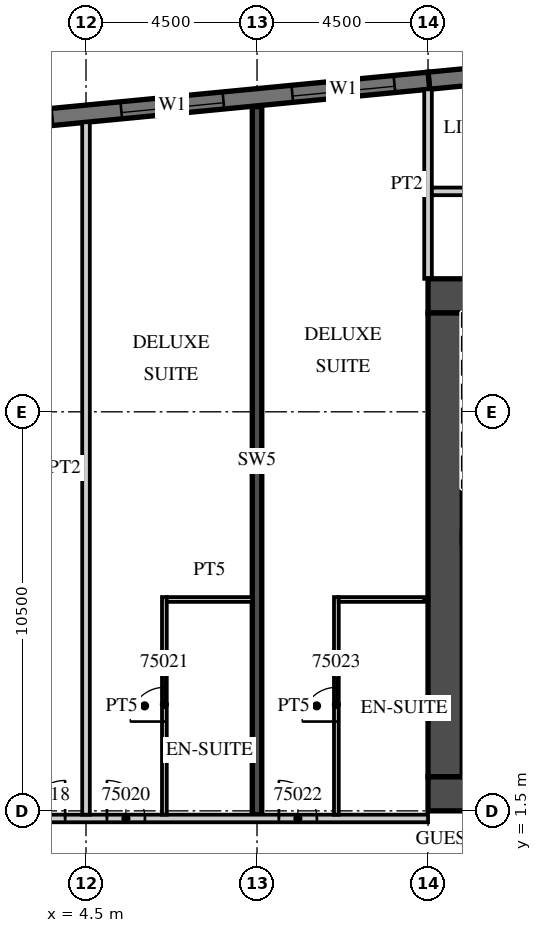
"""IFC4 building model, lengths in metres.
Left out: names, types, materials, properties, quantities, classifications, styles, units other than length and angle.
Written with IfcOpenShell. Run it as: python <this file> out.ifc"""

import sys

from ifc_helpers import new_model, si_unit, direction, frame, frame_2d, origin, place, context, subcontext, project, spatial, rectangle, extrude, element, fill, save


model = new_model("IFC4")
c1 = context("Model", 3, precision=1e-05, world=origin(), true_north=direction((0.0, 1.0)))
c2 = subcontext(c1, "Body", "Model", "MODEL_VIEW")
j1 = project(units=[si_unit("LENGTHUNIT", "METRE"), si_unit("PLANEANGLEUNIT", "RADIAN")], contexts=[c1])
p1 = place(None, origin())
s1 = spatial("IfcSite", under=j1, at=p1, CompositionType="ELEMENT")
p2 = place(p1, origin())
s2 = spatial("IfcBuilding", under=s1, at=p2, CompositionType="ELEMENT")
p3 = place(p2, frame((0.0, 0.0, 298.2)))
s3 = spatial("IfcBuildingStorey", under=s2, at=p3, CompositionType="ELEMENT", Elevation=298.2)
p4 = place(p3, frame((9.0, 1.4, 0.0), z_axis=(0.0, 0.0, 1.0), x_axis=(0.0, 1.0, 0.0)))
e1 = element("IfcWall", 1, at=p4, inside=s3, PredefinedType="SHEAR", context=c2, shape_type="SweptSolid", body=[
    extrude(rectangle(XDim=18.629, YDim=0.25, at=frame_2d((9.315, 0.0))), origin(), (0.0, 0.0, 1.0), 3.3),
])
p5 = place(p3, frame((30.946, 22.391, 0.0), z_axis=(0.0, 0.0, 1.0), x_axis=(-0.995396397117, -0.095843688398, 0.0)))
e2 = element("IfcWall", 2, at=p5, inside=s3, PredefinedType="SOLIDWALL", context=c2, shape_type="SweptSolid", body=[
    extrude(rectangle(XDim=17.505, YDim=0.45, at=frame_2d((8.752, 0.0))), origin(), (0.0, 0.0, 1.0), 3.02),
])
p6 = place(p3, frame((13.521, 20.713, 0.0), z_axis=(0.0, 0.0, 1.0), x_axis=(-0.995396277313, -0.095844932638, 0.0)))
e3 = element("IfcWall", 3, at=p6, inside=s3, PredefinedType="SOLIDWALL", context=c2, shape_type="SweptSolid", body=[
    extrude(rectangle(XDim=51.495, YDim=0.45, at=frame_2d((25.748, 0.0))), origin(), (0.0, 0.0, 1.0), 3.02),
])
p7 = place(p6, frame((0.91, 0.0, 0.45)))
e4 = element("IfcOpeningElement", 4, at=p7, cuts=e3, PredefinedType="OPENING", context=c2, shape_type="SweptSolid", body=[
    extrude(rectangle(XDim=2.7, YDim=2.25, at=frame_2d((1.35, 1.125))), frame((0.0, 0.235, 0.0), z_axis=(0.0, -1.0, 0.0), x_axis=(1.0, 0.0, 0.0)), (0.0, 0.0, 1.0), 0.47),
])
p8 = place(p6, frame((5.431, 0.0, 0.45)))
e5 = element("IfcOpeningElement", 5, at=p8, cuts=e3, PredefinedType="OPENING", context=c2, shape_type="SweptSolid", body=[
    extrude(rectangle(XDim=2.7, YDim=2.25, at=frame_2d((1.35, 1.125))), frame((0.0, 0.235, 0.0), z_axis=(0.0, -1.0, 0.0), x_axis=(1.0, 0.0, 0.0)), (0.0, 0.0, 1.0), 0.47),
])
p9 = place(p6, frame((9.952, 0.0, 0.45)))
e6 = element("IfcOpeningElement", 6, at=p9, cuts=e3, PredefinedType="OPENING", context=c2, shape_type="SweptSolid", body=[
    extrude(rectangle(XDim=2.7, YDim=2.25, at=frame_2d((1.35, 1.125))), frame((0.0, 0.235, 0.0), z_axis=(0.0, -1.0, 0.0), x_axis=(1.0, 0.0, 0.0)), (0.0, 0.0, 1.0), 0.47),
])
p10 = place(p6, frame((14.473, 0.0, 0.45)))
e7 = element("IfcOpeningElement", 7, at=p10, cuts=e3, PredefinedType="OPENING", context=c2, shape_type="SweptSolid", body=[
    extrude(rectangle(XDim=2.7, YDim=2.25, at=frame_2d((1.35, 1.125))), frame((0.0, 0.235, 0.0), z_axis=(0.0, -1.0, 0.0), x_axis=(1.0, 0.0, 0.0)), (0.0, 0.0, 1.0), 0.47),
])
p11 = place(p6, frame((18.994, 0.0, 0.45)))
e8 = element("IfcOpeningElement", 8, at=p11, cuts=e3, PredefinedType="OPENING", context=c2, shape_type="SweptSolid", body=[
    extrude(rectangle(XDim=2.7, YDim=2.25, at=frame_2d((1.35, 1.125))), frame((0.0, 0.235, 0.0), z_axis=(0.0, -1.0, 0.0), x_axis=(1.0, 0.0, 0.0)), (0.0, 0.0, 1.0), 0.47),
])
p12 = place(p6, frame((23.514, 0.0, 0.45)))
e9 = element("IfcOpeningElement", 9, at=p12, cuts=e3, PredefinedType="OPENING", context=c2, shape_type="SweptSolid", body=[
    extrude(rectangle(XDim=2.7, YDim=2.25, at=frame_2d((1.35, 1.125))), frame((0.0, 0.235, 0.0), z_axis=(0.0, -1.0, 0.0), x_axis=(1.0, 0.0, 0.0)), (0.0, 0.0, 1.0), 0.47),
])
p13 = place(p6, frame((28.035, 0.0, 0.45)))
e10 = element("IfcOpeningElement", 10, at=p13, cuts=e3, PredefinedType="OPENING", context=c2, shape_type="SweptSolid", body=[
    extrude(rectangle(XDim=2.7, YDim=2.25, at=frame_2d((1.35, 1.125))), frame((0.0, 0.235, 0.0), z_axis=(0.0, -1.0, 0.0), x_axis=(1.0, 0.0, 0.0)), (0.0, 0.0, 1.0), 0.47),
])
p14 = place(p6, frame((32.556, 0.0, 0.45)))
e11 = element("IfcOpeningElement", 11, at=p14, cuts=e3, PredefinedType="OPENING", context=c2, shape_type="SweptSolid", body=[
    extrude(rectangle(XDim=2.7, YDim=2.25, at=frame_2d((1.35, 1.125))), frame((0.0, 0.235, 0.0), z_axis=(0.0, -1.0, 0.0), x_axis=(1.0, 0.0, 0.0)), (0.0, 0.0, 1.0), 0.47),
])
p15 = place(p6, frame((37.077, 0.0, 0.45)))
e12 = element("IfcOpeningElement", 12, at=p15, cuts=e3, PredefinedType="OPENING", context=c2, shape_type="SweptSolid", body=[
    extrude(rectangle(XDim=2.7, YDim=2.25, at=frame_2d((1.35, 1.125))), frame((0.0, 0.235, 0.0), z_axis=(0.0, -1.0, 0.0), x_axis=(1.0, 0.0, 0.0)), (0.0, 0.0, 1.0), 0.47),
])
p16 = place(p6, frame((41.598, 0.0, 0.45)))
e13 = element("IfcOpeningElement", 13, at=p16, cuts=e3, PredefinedType="OPENING", context=c2, shape_type="SweptSolid", body=[
    extrude(rectangle(XDim=2.7, YDim=2.25, at=frame_2d((1.35, 1.125))), frame((0.0, 0.235, 0.0), z_axis=(0.0, -1.0, 0.0), x_axis=(1.0, 0.0, 0.0)), (0.0, 0.0, 1.0), 0.47),
])
p17 = place(p6, frame((46.118, 0.0, 0.45)))
e14 = element("IfcOpeningElement", 14, at=p17, cuts=e3, PredefinedType="OPENING", context=c2, shape_type="SweptSolid", body=[
    extrude(rectangle(XDim=2.7, YDim=2.25, at=frame_2d((1.35, 1.125))), frame((0.0, 0.235, 0.0), z_axis=(0.0, -1.0, 0.0), x_axis=(1.0, 0.0, 0.0)), (0.0, 0.0, 1.0), 0.47),
])
p18 = place(p3, frame((13.5, 15.5, 0.0), z_axis=(0.0, 0.0, 1.0), x_axis=(0.0, 1.0, 0.0)))
e15 = element("IfcWall", 15, at=p18, inside=s3, PredefinedType="PARTITIONING", context=c2, shape_type="SweptSolid", body=[
    extrude(rectangle(XDim=4.985, YDim=0.2, at=frame_2d((2.493, 0.0))), origin(), (0.0, 0.0, 1.0), 3.02),
])
p19 = place(p3, frame((-39.909, 1.3, 0.0), z_axis=(0.0, 0.0, 1.0), x_axis=(1.0, 0.0, 0.0)))
e16 = element("IfcWall", 16, at=p19, inside=s3, PredefinedType="PARTITIONING", context=c2, shape_type="SweptSolid", body=[
    extrude(rectangle(XDim=53.409, YDim=0.2, at=frame_2d((26.705, 0.0))), origin(), (0.0, 0.0, 1.0), 3.02),
])
p20 = place(p19, frame((0.255, 0.0, 0.0)))
e17 = element("IfcOpeningElement", 17, at=p20, cuts=e16, PredefinedType="OPENING", context=c2, shape_type="SweptSolid", body=[
    extrude(rectangle(XDim=0.9, YDim=2.1, at=frame_2d((0.45, 1.05))), frame((0.0, 0.11, 0.0), z_axis=(0.0, -1.0, 0.0), x_axis=(1.0, 0.0, 0.0)), (0.0, 0.0, 1.0), 0.22),
])
p21 = place(p19, frame((4.484, 0.0, 0.0)))
e18 = element("IfcOpeningElement", 18, at=p21, cuts=e16, PredefinedType="OPENING", context=c2, shape_type="SweptSolid", body=[
    extrude(rectangle(XDim=1.0, YDim=2.1, at=frame_2d((0.5, 1.05))), frame((0.0, 0.11, 0.0), z_axis=(0.0, -1.0, 0.0), x_axis=(1.0, 0.0, 0.0)), (0.0, 0.0, 1.0), 0.22),
])
p22 = place(p19, frame((11.334, 0.0, 0.0)))
e19 = element("IfcOpeningElement", 19, at=p22, cuts=e16, PredefinedType="OPENING", context=c2, shape_type="SweptSolid", body=[
    extrude(rectangle(XDim=1.0, YDim=2.1, at=frame_2d((0.5, 1.05))), frame((0.0, 0.11, 0.0), z_axis=(0.0, -1.0, 0.0), x_axis=(1.0, 0.0, 0.0)), (0.0, 0.0, 1.0), 0.22),
])
p23 = place(p19, frame((15.347, 0.0, 0.0)))
e20 = element("IfcOpeningElement", 20, at=p23, cuts=e16, PredefinedType="OPENING", context=c2, shape_type="SweptSolid", body=[
    extrude(rectangle(XDim=1.2, YDim=2.1, at=frame_2d((0.6, 1.05))), frame((0.0, 0.11, 0.0), z_axis=(0.0, -1.0, 0.0), x_axis=(1.0, 0.0, 0.0)), (0.0, 0.0, 1.0), 0.22),
])
p24 = place(p19, frame((24.859, 0.0, 0.0)))
e21 = element("IfcOpeningElement", 21, at=p24, cuts=e16, PredefinedType="OPENING", context=c2, shape_type="SweptSolid", body=[
    extrude(rectangle(XDim=1.0, YDim=2.1, at=frame_2d((0.5, 1.05))), frame((0.0, 0.11, 0.0), z_axis=(0.0, -1.0, 0.0), x_axis=(1.0, 0.0, 0.0)), (0.0, 0.0, 1.0), 0.22),
])
p25 = place(p19, frame((26.959, 0.0, 0.0)))
e22 = element("IfcOpeningElement", 22, at=p25, cuts=e16, PredefinedType="OPENING", context=c2, shape_type="SweptSolid", body=[
    extrude(rectangle(XDim=1.0, YDim=2.1, at=frame_2d((0.5, 1.05))), frame((0.0, 0.11, 0.0), z_axis=(0.0, -1.0, 0.0), x_axis=(1.0, 0.0, 0.0)), (0.0, 0.0, 1.0), 0.22),
])
p26 = place(p19, frame((33.346, 0.0, 0.0)))
e23 = element("IfcOpeningElement", 23, at=p26, cuts=e16, PredefinedType="OPENING", context=c2, shape_type="SweptSolid", body=[
    extrude(rectangle(XDim=1.2, YDim=2.1, at=frame_2d((0.6, 1.05))), frame((0.0, 0.11, 0.0), z_axis=(0.0, -1.0, 0.0), x_axis=(1.0, 0.0, 0.0)), (0.0, 0.0, 1.0), 0.22),
])
p27 = place(p19, frame((42.859, 0.0, 0.0)))
e24 = element("IfcOpeningElement", 24, at=p27, cuts=e16, PredefinedType="OPENING", context=c2, shape_type="SweptSolid", body=[
    extrude(rectangle(XDim=1.0, YDim=2.1, at=frame_2d((0.5, 1.05))), frame((0.0, 0.11, 0.0), z_axis=(0.0, -1.0, 0.0), x_axis=(1.0, 0.0, 0.0)), (0.0, 0.0, 1.0), 0.22),
])
p28 = place(p19, frame((44.959, 0.0, 0.0)))
e25 = element("IfcOpeningElement", 25, at=p28, cuts=e16, PredefinedType="OPENING", context=c2, shape_type="SweptSolid", body=[
    extrude(rectangle(XDim=1.0, YDim=2.1, at=frame_2d((0.5, 1.05))), frame((0.0, 0.11, 0.0), z_axis=(0.0, -1.0, 0.0), x_axis=(1.0, 0.0, 0.0)), (0.0, 0.0, 1.0), 0.22),
])
p29 = place(p19, frame((49.484, 0.0, 0.0)))
e26 = element("IfcOpeningElement", 26, at=p29, cuts=e16, PredefinedType="OPENING", context=c2, shape_type="SweptSolid", body=[
    extrude(rectangle(XDim=1.0, YDim=2.1, at=frame_2d((0.5, 1.05))), frame((0.0, 0.11, 0.0), z_axis=(0.0, -1.0, 0.0), x_axis=(1.0, 0.0, 0.0)), (0.0, 0.0, 1.0), 0.22),
])
p30 = place(p3, frame((4.5, 1.4, 0.0), z_axis=(0.0, 0.0, 1.0), x_axis=(0.0, 1.0, 0.0)))
e27 = element("IfcWall", 27, at=p30, inside=s3, PredefinedType="PARTITIONING", context=c2, shape_type="SweptSolid", body=[
    extrude(rectangle(XDim=18.218, YDim=0.2, at=frame_2d((9.109, 0.0))), origin(), (0.0, 0.0, 1.0), 3.02),
])
p31 = place(p3, frame((6.562, 1.4, 0.0), z_axis=(0.0, 0.0, 1.0), x_axis=(0.0, 1.0, 0.0)))
e28 = element("IfcWall", 28, at=p31, inside=s3, PredefinedType="PARTITIONING", context=c2, shape_type="SweptSolid", body=[
    extrude(rectangle(XDim=5.725, YDim=0.125, at=frame_2d((2.863, 0.0))), origin(), (0.0, 0.0, 1.0), 3.02),
])
p32 = place(p31, frame((2.45, 0.0, 0.0)))
e29 = element("IfcOpeningElement", 29, at=p32, cuts=e28, PredefinedType="OPENING", context=c2, shape_type="SweptSolid", body=[
    extrude(rectangle(XDim=0.9, YDim=2.1, at=frame_2d((0.45, 1.05))), frame((0.0, 0.073, 0.0), z_axis=(0.0, -1.0, 0.0), x_axis=(1.0, 0.0, 0.0)), (0.0, 0.0, 1.0), 0.145),
])
p33 = place(p3, frame((6.625, 7.062, 0.0), z_axis=(0.0, 0.0, 1.0), x_axis=(1.0, 0.0, 0.0)))
e30 = element("IfcWall", 30, at=p33, inside=s3, PredefinedType="PARTITIONING", context=c2, shape_type="SweptSolid", body=[
    extrude(rectangle(XDim=2.25, YDim=0.125, at=frame_2d((1.125, 0.0))), origin(), (0.0, 0.0, 1.0), 3.02),
])
p34 = place(p3, frame((11.088, 1.4, 0.0), z_axis=(0.0, 0.0, 1.0), x_axis=(0.0, 1.0, 0.0)))
e31 = element("IfcWall", 31, at=p34, inside=s3, PredefinedType="PARTITIONING", context=c2, shape_type="SweptSolid", body=[
    extrude(rectangle(XDim=5.725, YDim=0.125, at=frame_2d((2.863, 0.0))), origin(), (0.0, 0.0, 1.0), 3.02),
])
p35 = place(p34, frame((2.45, 0.0, 0.0)))
e32 = element("IfcOpeningElement", 32, at=p35, cuts=e31, PredefinedType="OPENING", context=c2, shape_type="SweptSolid", body=[
    extrude(rectangle(XDim=0.9, YDim=2.1, at=frame_2d((0.45, 1.05))), frame((0.0, 0.073, 0.0), z_axis=(0.0, -1.0, 0.0), x_axis=(1.0, 0.0, 0.0)), (0.0, 0.0, 1.0), 0.145),
])
p36 = place(p3, frame((11.15, 7.062, 0.0), z_axis=(0.0, 0.0, 1.0), x_axis=(1.0, 0.0, 0.0)))
e33 = element("IfcWall", 33, at=p36, inside=s3, PredefinedType="PARTITIONING", context=c2, shape_type="SweptSolid", body=[
    extrude(rectangle(XDim=2.25, YDim=0.125, at=frame_2d((1.125, 0.0))), origin(), (0.0, 0.0, 1.0), 3.02),
])
p37 = place(p3, frame((13.5, 1.95, 0.0), z_axis=(0.0, 0.0, 1.0), x_axis=(1.0, 0.0, 0.0)))
e34 = element("IfcWall", 34, at=p37, inside=s3, PredefinedType="SHEAR", context=c2, shape_type="SweptSolid", body=[
    extrude(rectangle(XDim=18.0, YDim=0.9, at=frame_2d((9.0, 0.0))), origin(), (0.0, 0.0, 1.0), 3.02),
])
p38 = place(p37, frame((1.475, 0.0, 0.0)))
e35 = element("IfcOpeningElement", 35, at=p38, cuts=e34, PredefinedType="OPENING", context=c2, shape_type="SweptSolid", body=[
    extrude(rectangle(XDim=1.8, YDim=2.1, at=frame_2d((0.9, 1.05))), frame((0.0, 0.46, 0.0), z_axis=(0.0, -1.0, 0.0), x_axis=(1.0, 0.0, 0.0)), (0.0, 0.0, 1.0), 0.92),
])
p39 = place(p3, frame((13.5, 15.05, 0.0), z_axis=(0.0, 0.0, 1.0), x_axis=(1.0, 0.0, 0.0)))
e36 = element("IfcWall", 36, at=p39, inside=s3, PredefinedType="SHEAR", context=c2, shape_type="SweptSolid", body=[
    extrude(rectangle(XDim=6.8, YDim=0.9, at=frame_2d((3.4, 0.0))), origin(), (0.0, 0.0, 1.0), 3.02),
])
p40 = place(p39, frame((4.725, 0.0, 0.0)))
e37 = element("IfcOpeningElement", 37, at=p40, cuts=e36, PredefinedType="OPENING", context=c2, shape_type="SweptSolid", body=[
    extrude(rectangle(XDim=1.2, YDim=2.1, at=frame_2d((0.6, 1.05))), frame((0.0, 0.46, 0.0), z_axis=(0.0, -1.0, 0.0), x_axis=(1.0, 0.0, 0.0)), (0.0, 0.0, 1.0), 0.92),
])
p41 = place(p3, frame((13.95, 2.4, 0.0), z_axis=(0.0, 0.0, 1.0), x_axis=(0.0, 1.0, 0.0)))
e38 = element("IfcWall", 38, at=p41, inside=s3, PredefinedType="SHEAR", context=c2, shape_type="SweptSolid", body=[
    extrude(rectangle(XDim=12.2, YDim=0.9, at=frame_2d((6.1, 0.0))), origin(), (0.0, 0.0, 1.0), 3.02),
])
p42 = place(p3, frame((13.6, 17.8, 0.0), z_axis=(0.0, 0.0, 1.0), x_axis=(1.0, 0.0, 0.0)))
e39 = element("IfcWall", 39, at=p42, inside=s3, PredefinedType="PARTITIONING", context=c2, shape_type="SweptSolid", body=[
    extrude(rectangle(XDim=21.354, YDim=0.2, at=frame_2d((10.677, 0.0))), origin(), (0.0, 0.0, 1.0), 3.02),
])
p43 = place(p42, frame((16.613, 0.0, 0.0)))
e40 = element("IfcOpeningElement", 40, at=p43, cuts=e39, PredefinedType="OPENING", context=c2, shape_type="SweptSolid", body=[
    extrude(rectangle(XDim=0.9, YDim=2.1, at=frame_2d((0.45, 1.05))), frame((0.0, 0.11, 0.0), z_axis=(0.0, -1.0, 0.0), x_axis=(1.0, 0.0, 0.0)), (0.0, 0.0, 1.0), 0.22),
])
p44 = place(p42, frame((8.312, 0.0, 0.0)))
e41 = element("IfcOpeningElement", 41, at=p44, cuts=e39, PredefinedType="OPENING", context=c2, shape_type="SweptSolid", body=[
    extrude(rectangle(XDim=0.9, YDim=2.1, at=frame_2d((0.45, 1.05))), frame((0.0, 0.11, 0.0), z_axis=(0.0, -1.0, 0.0), x_axis=(1.0, 0.0, 0.0)), (0.0, 0.0, 1.0), 0.22),
])
p45 = place(p7, origin())
e42 = element("IfcWindow", 42, at=p45, inside=s3, PartitioningType="SINGLE_PANEL", PredefinedType="WINDOW", context=c2, shape_type="SweptSolid", body=[
    extrude(rectangle(XDim=2.7, YDim=2.25, at=frame_2d((1.35, 1.125))), frame((0.0, 0.09, 0.0), z_axis=(0.0, -1.0, 0.0), x_axis=(1.0, 0.0, 0.0)), (0.0, 0.0, 1.0), 0.06),
])
fill(e4, e42)
p46 = place(p8, origin())
e43 = element("IfcWindow", 43, at=p46, inside=s3, PartitioningType="SINGLE_PANEL", PredefinedType="WINDOW", context=c2, shape_type="SweptSolid", body=[
    extrude(rectangle(XDim=2.7, YDim=2.25, at=frame_2d((1.35, 1.125))), frame((0.0, 0.09, 0.0), z_axis=(0.0, -1.0, 0.0), x_axis=(1.0, 0.0, 0.0)), (0.0, 0.0, 1.0), 0.06),
])
fill(e5, e43)
p47 = place(p9, origin())
e44 = element("IfcWindow", 44, at=p47, inside=s3, PartitioningType="SINGLE_PANEL", PredefinedType="WINDOW", context=c2, shape_type="SweptSolid", body=[
    extrude(rectangle(XDim=2.7, YDim=2.25, at=frame_2d((1.35, 1.125))), frame((0.0, 0.09, 0.0), z_axis=(0.0, -1.0, 0.0), x_axis=(1.0, 0.0, 0.0)), (0.0, 0.0, 1.0), 0.06),
])
fill(e6, e44)
p48 = place(p27, origin())
e45 = element("IfcDoor", 45, at=p48, inside=s3, OperationType="SINGLE_SWING_RIGHT", PredefinedType="DOOR", context=c2, shape_type="SweptSolid", body=[
    extrude(rectangle(XDim=1.0, YDim=2.1, at=frame_2d((0.5, 1.05))), frame((0.0, 0.025, 0.0), z_axis=(0.0, -1.0, 0.0), x_axis=(1.0, 0.0, 0.0)), (0.0, 0.0, 1.0), 0.05),
])
fill(e24, e45)
p49 = place(p28, origin())
e46 = element("IfcDoor", 46, at=p49, inside=s3, OperationType="SINGLE_SWING_LEFT", PredefinedType="DOOR", context=c2, shape_type="SweptSolid", body=[
    extrude(rectangle(XDim=1.0, YDim=2.1, at=frame_2d((0.5, 1.05))), frame((0.0, 0.025, 0.0), z_axis=(0.0, -1.0, 0.0), x_axis=(1.0, 0.0, 0.0)), (0.0, 0.0, 1.0), 0.05),
])
fill(e25, e46)
p50 = place(p32, origin())
e47 = element("IfcDoor", 47, at=p50, inside=s3, OperationType="SINGLE_SWING_LEFT", PredefinedType="DOOR", context=c2, shape_type="SweptSolid", body=[
    extrude(rectangle(XDim=0.9, YDim=2.1, at=frame_2d((0.45, 1.05))), frame((0.0, 0.025, 0.0), z_axis=(0.0, -1.0, 0.0), x_axis=(1.0, 0.0, 0.0)), (0.0, 0.0, 1.0), 0.05),
])
fill(e29, e47)
p51 = place(p29, origin())
e48 = element("IfcDoor", 48, at=p51, inside=s3, OperationType="SINGLE_SWING_LEFT", PredefinedType="DOOR", context=c2, shape_type="SweptSolid", body=[
    extrude(rectangle(XDim=1.0, YDim=2.1, at=frame_2d((0.5, 1.05))), frame((0.0, 0.025, 0.0), z_axis=(0.0, -1.0, 0.0), x_axis=(1.0, 0.0, 0.0)), (0.0, 0.0, 1.0), 0.05),
])
fill(e26, e48)
p52 = place(p35, origin())
e49 = element("IfcDoor", 49, at=p52, inside=s3, OperationType="SINGLE_SWING_LEFT", PredefinedType="DOOR", context=c2, shape_type="SweptSolid", body=[
    extrude(rectangle(XDim=0.9, YDim=2.1, at=frame_2d((0.45, 1.05))), frame((0.0, 0.025, 0.0), z_axis=(0.0, -1.0, 0.0), x_axis=(1.0, 0.0, 0.0)), (0.0, 0.0, 1.0), 0.05),
])
fill(e32, e49)
save(model, sys.argv[1])
